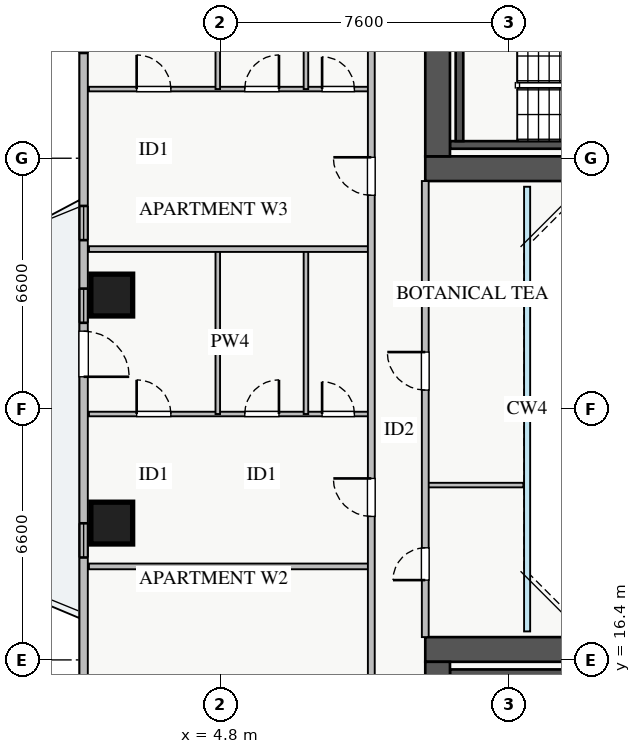
"""IFC4 building model, lengths in metres.
Left out: names, types, materials, properties, quantities, classifications, styles, units other than length and angle.
Written with IfcOpenShell. Run it as: python <this file> out.ifc"""

import sys

from ifc_helpers import new_model, si_unit, direction, frame, frame_2d, origin, origin_2d, place, context, subcontext, project, spatial, rectangle, extrude, source, transform, mapped, element, fill, save


model = new_model("IFC4")
c1 = context("Model", 3, precision=1e-05, world=origin(), true_north=direction((0.0, 1.0)))
c2 = subcontext(c1, "Body", "Model", "MODEL_VIEW")
j1 = project(units=[si_unit("LENGTHUNIT", "METRE"), si_unit("PLANEANGLEUNIT", "RADIAN")], contexts=[c1])
p1 = place(None, origin())
s1 = spatial("IfcSite", under=j1, at=p1, CompositionType="ELEMENT")
p2 = place(p1, origin())
s2 = spatial("IfcBuilding", under=s1, at=p2, CompositionType="ELEMENT")
p3 = place(p2, frame((0.0, 0.0, 110.0)))
s3 = spatial("IfcBuildingStorey", under=s2, at=p3, CompositionType="ELEMENT", Elevation=110.0)
p4 = place(p3, frame((10.85, 29.95, 0.0), z_axis=(0.0, 0.0, 1.0), x_axis=(1.0, 0.0, 0.0)))
e1 = element("IfcWall", 1, at=p4, inside=s3, PredefinedType="SHEAR", context=c2, shape_type="SweptSolid", body=[
    extrude(rectangle(XDim=7.3, YDim=0.2, at=frame_2d((3.65, 0.0))), origin(), (0.0, 0.0, 1.0), 3.25),
])
p5 = place(p3, frame((11.1, 30.05, 0.0), z_axis=(0.0, 0.0, 1.0), x_axis=(0.0, 1.0, 0.0)))
e2 = element("IfcWall", 2, at=p5, inside=s3, PredefinedType="SHEAR", context=c2, shape_type="SweptSolid", body=[
    extrude(rectangle(XDim=2.94, YDim=0.2, at=frame_2d((1.47, 0.0))), origin(), (0.0, 0.0, 1.0), 3.25),
])
p6 = place(p3, frame((10.85, 16.05, 0.0), z_axis=(0.0, 0.0, 1.0), x_axis=(1.0, 0.0, 0.0)))
e3 = element("IfcWall", 3, at=p6, inside=s3, PredefinedType="SHEAR", context=c2, shape_type="SweptSolid", body=[
    extrude(rectangle(XDim=7.3, YDim=0.2, at=frame_2d((3.65, 0.0))), origin(), (0.0, 0.0, 1.0), 3.25),
])
p7 = place(p3, frame((10.2, 29.325, 0.0), z_axis=(0.0, 0.0, 1.0), x_axis=(1.0, 0.0, 0.0)))
e4 = element("IfcWall", 4, at=p7, inside=s3, PredefinedType="SHEAR", context=c2, shape_type="SweptSolid", body=[
    extrude(rectangle(XDim=17.6, YDim=0.65, at=frame_2d((8.8, 0.0))), origin(), (0.0, 0.0, 1.0), 3.25),
])
p8 = place(p3, frame((10.525, 29.65, 0.0), z_axis=(0.0, 0.0, 1.0), x_axis=(0.0, 1.0, 0.0)))
e5 = element("IfcWall", 5, at=p8, inside=s3, PredefinedType="SHEAR", context=c2, shape_type="SweptSolid", body=[
    extrude(rectangle(XDim=5.9, YDim=0.65, at=frame_2d((2.95, 0.0))), origin(), (0.0, 0.0, 1.0), 3.25),
])
p9 = place(p3, frame((10.2, 16.675, 0.0), z_axis=(0.0, 0.0, 1.0), x_axis=(1.0, 0.0, 0.0)))
e6 = element("IfcWall", 6, at=p9, inside=s3, PredefinedType="SHEAR", context=c2, shape_type="SweptSolid", body=[
    extrude(rectangle(XDim=17.6, YDim=0.65, at=frame_2d((8.8, 0.0))), origin(), (0.0, 0.0, 1.0), 3.25),
])
p10 = place(p3, frame((10.525, 10.45, 0.0), z_axis=(0.0, 0.0, 1.0), x_axis=(0.0, 1.0, 0.0)))
e7 = element("IfcWall", 7, at=p10, inside=s3, PredefinedType="SHEAR", context=c2, shape_type="SweptSolid", body=[
    extrude(rectangle(XDim=5.9, YDim=0.65, at=frame_2d((2.95, 0.0))), origin(), (0.0, 0.0, 1.0), 3.25),
])
m1 = source(origin(), c2, "Body", "SweptSolid", [
    extrude(rectangle(XDim=1.1, YDim=1.1, at=origin_2d()), origin(), (0.0, 0.0, 1.0), 3.25),
])
for number, where, z_axis, x_axis in (
    (8, (1.95, 26.0, 0.0), (0.0, 0.0, 1.0), (1.0, 0.0, 0.0)),
    (9, (1.95, 20.0, 0.0), (0.0, 0.0, 1.0), (1.0, 0.0, 0.0)),
):
    element("IfcColumn", number, at=place(p3, frame(where, z_axis=z_axis, x_axis=x_axis)), inside=s3, PredefinedType="COLUMN", context=c2, shape_type="MappedRepresentation", body=[
        mapped(m1, transform((0.0, 0.0, 0.0), x_axis=(1.0, 0.0, 0.0), y_axis=(0.0, 1.0, 0.0), z_axis=(0.0, 0.0, 1.0), scale=1.0)),
    ])
p11 = place(p3, frame((1.21, 10.55, 0.0), z_axis=(0.0, 0.0, 1.0), x_axis=(0.0, 1.0, 0.0)))
e10 = element("IfcWall", 10, at=p11, inside=s3, PredefinedType="STANDARD", context=c2, shape_type="SweptSolid", body=[
    extrude(rectangle(XDim=24.9, YDim=0.22, at=frame_2d((12.45, 0.0))), origin(), (0.0, 0.0, 1.0), 2.61),
])
p12 = place(p11, frame((13.3, 0.0, 0.0)))
e11 = element("IfcOpeningElement", 11, at=p12, cuts=e10, PredefinedType="OPENING", context=c2, shape_type="SweptSolid", body=[
    extrude(rectangle(XDim=1.2, YDim=2.1, at=frame_2d((0.6, 1.05))), frame((0.0, 0.12, 0.0), z_axis=(0.0, -1.0, 0.0), x_axis=(1.0, 0.0, 0.0)), (0.0, 0.0, 1.0), 0.24),
])
p13 = place(p11, frame((1.912, 0.0, 0.9)))
e12 = element("IfcOpeningElement", 12, at=p13, cuts=e10, PredefinedType="OPENING", context=c2, shape_type="SweptSolid", body=[
    extrude(rectangle(XDim=2.4, YDim=1.48, at=frame_2d((1.2, 0.74))), frame((0.0, 0.12, 0.0), z_axis=(0.0, -1.0, 0.0), x_axis=(1.0, 0.0, 0.0)), (0.0, 0.0, 1.0), 0.24),
])
p14 = place(p11, frame((21.82, 0.0, 0.9)))
e13 = element("IfcOpeningElement", 13, at=p14, cuts=e10, PredefinedType="OPENING", context=c2, shape_type="SweptSolid", body=[
    extrude(rectangle(XDim=2.1, YDim=1.5, at=frame_2d((1.05, 0.75))), frame((0.0, 0.12, 0.0), z_axis=(0.0, -1.0, 0.0), x_axis=(1.0, 0.0, 0.0)), (0.0, 0.0, 1.0), 0.24),
])
p15 = place(p11, frame((14.72, 0.0, 0.9)))
e14 = element("IfcOpeningElement", 14, at=p15, cuts=e10, PredefinedType="OPENING", context=c2, shape_type="SweptSolid", body=[
    extrude(rectangle(XDim=0.9, YDim=1.2, at=frame_2d((0.45, 0.6))), frame((0.0, 0.12, 0.0), z_axis=(0.0, -1.0, 0.0), x_axis=(1.0, 0.0, 0.0)), (0.0, 0.0, 1.0), 0.24),
])
p16 = place(p11, frame((8.545, 0.0, 0.9)))
e15 = element("IfcOpeningElement", 15, at=p16, cuts=e10, PredefinedType="OPENING", context=c2, shape_type="SweptSolid", body=[
    extrude(rectangle(XDim=0.9, YDim=1.2, at=frame_2d((0.45, 0.6))), frame((0.0, 0.12, 0.0), z_axis=(0.0, -1.0, 0.0), x_axis=(1.0, 0.0, 0.0)), (0.0, 0.0, 1.0), 0.24),
])
p17 = place(p11, frame((16.895, 0.0, 0.9)))
e16 = element("IfcOpeningElement", 16, at=p17, cuts=e10, PredefinedType="OPENING", context=c2, shape_type="SweptSolid", body=[
    extrude(rectangle(XDim=0.9, YDim=1.2, at=frame_2d((0.45, 0.6))), frame((0.0, 0.12, 0.0), z_axis=(0.0, -1.0, 0.0), x_axis=(1.0, 0.0, 0.0)), (0.0, 0.0, 1.0), 0.24),
])
p18 = place(p3, frame((1.35, 22.87, 0.0), z_axis=(0.0, 0.0, 1.0), x_axis=(1.0, 0.0, 0.0)))
e17 = element("IfcWall", 17, at=p18, inside=s3, PredefinedType="PLUMBINGWALL", context=c2, shape_type="SweptSolid", body=[
    extrude(rectangle(XDim=7.43, YDim=0.12, at=frame_2d((3.715, 0.0))), origin(), (0.0, 0.0, 1.0), 3.07),
])
p19 = place(p18, frame((1.255, 0.0, 0.0)))
e18 = element("IfcOpeningElement", 18, at=p19, cuts=e17, PredefinedType="OPENING", context=c2, shape_type="SweptSolid", body=[
    extrude(rectangle(XDim=0.9, YDim=2.05, at=frame_2d((0.45, 1.025))), frame((0.0, 0.07, 0.0), z_axis=(0.0, -1.0, 0.0), x_axis=(1.0, 0.0, 0.0)), (0.0, 0.0, 1.0), 0.14),
])
p20 = place(p18, frame((4.1, 0.0, 0.0)))
e19 = element("IfcOpeningElement", 19, at=p20, cuts=e17, PredefinedType="OPENING", context=c2, shape_type="SweptSolid", body=[
    extrude(rectangle(XDim=0.9, YDim=2.05, at=frame_2d((0.45, 1.025))), frame((0.0, 0.07, 0.0), z_axis=(0.0, -1.0, 0.0), x_axis=(1.0, 0.0, 0.0)), (0.0, 0.0, 1.0), 0.14),
])
p21 = place(p18, frame((6.135, 0.0, 0.0)))
e20 = element("IfcOpeningElement", 20, at=p21, cuts=e17, PredefinedType="OPENING", context=c2, shape_type="SweptSolid", body=[
    extrude(rectangle(XDim=0.85, YDim=2.05, at=frame_2d((0.425, 1.025))), frame((0.0, 0.07, 0.0), z_axis=(0.0, -1.0, 0.0), x_axis=(1.0, 0.0, 0.0)), (0.0, 0.0, 1.0), 0.14),
])
for number, where, z_axis, x_axis in (
    (21, (4.74, 22.87, 0.0), (0.0, 0.0, 1.0), (0.0, 1.0, 0.0)),
    (22, (7.06, 22.87, 0.0), (0.0, 0.0, 1.0), (0.0, 1.0, 0.0)),
):
    element("IfcWall", number, at=place(p3, frame(where, z_axis=z_axis, x_axis=x_axis)), inside=s3, PredefinedType="PLUMBINGWALL", context=c2, shape_type="SweptSolid", body=[
        extrude(rectangle(XDim=4.34, YDim=0.12, at=frame_2d((2.17, 0.0))), origin(), (0.0, 0.0, 1.0), 3.07),
    ])
p22 = place(p3, frame((1.35, 18.86, 0.0), z_axis=(0.0, 0.0, 1.0), x_axis=(1.0, 0.0, 0.0)))
e23 = element("IfcWall", 23, at=p22, inside=s3, PredefinedType="PARTITIONING", context=c2, shape_type="SweptSolid", body=[
    extrude(rectangle(XDim=7.43, YDim=0.15, at=frame_2d((3.715, 0.0))), origin(), (0.0, 0.0, 1.0), 3.07),
])
p23 = place(p3, frame((1.35, 31.42, 0.0), z_axis=(0.0, 0.0, 1.0), x_axis=(1.0, 0.0, 0.0)))
e24 = element("IfcWall", 24, at=p23, inside=s3, PredefinedType="PLUMBINGWALL", context=c2, shape_type="SweptSolid", body=[
    extrude(rectangle(XDim=7.43, YDim=0.12, at=frame_2d((3.715, 0.0))), origin(), (0.0, 0.0, 1.0), 3.07),
])
p24 = place(p23, frame((1.255, 0.0, 0.0)))
e25 = element("IfcOpeningElement", 25, at=p24, cuts=e24, PredefinedType="OPENING", context=c2, shape_type="SweptSolid", body=[
    extrude(rectangle(XDim=0.9, YDim=2.05, at=frame_2d((0.45, 1.025))), frame((0.0, 0.07, 0.0), z_axis=(0.0, -1.0, 0.0), x_axis=(1.0, 0.0, 0.0)), (0.0, 0.0, 1.0), 0.14),
])
p25 = place(p23, frame((4.1, 0.0, 0.0)))
e26 = element("IfcOpeningElement", 26, at=p25, cuts=e24, PredefinedType="OPENING", context=c2, shape_type="SweptSolid", body=[
    extrude(rectangle(XDim=0.9, YDim=2.05, at=frame_2d((0.45, 1.025))), frame((0.0, 0.07, 0.0), z_axis=(0.0, -1.0, 0.0), x_axis=(1.0, 0.0, 0.0)), (0.0, 0.0, 1.0), 0.14),
])
p26 = place(p23, frame((6.135, 0.0, 0.0)))
e27 = element("IfcOpeningElement", 27, at=p26, cuts=e24, PredefinedType="OPENING", context=c2, shape_type="SweptSolid", body=[
    extrude(rectangle(XDim=0.85, YDim=2.05, at=frame_2d((0.425, 1.025))), frame((0.0, 0.07, 0.0), z_axis=(0.0, -1.0, 0.0), x_axis=(1.0, 0.0, 0.0)), (0.0, 0.0, 1.0), 0.14),
])
p27 = place(p3, frame((4.74, 31.42, 0.0), z_axis=(0.0, 0.0, 1.0), x_axis=(0.0, 1.0, 0.0)))
e28 = element("IfcWall", 28, at=p27, inside=s3, PredefinedType="PLUMBINGWALL", context=c2, shape_type="SweptSolid", body=[
    extrude(rectangle(XDim=4.56, YDim=0.12, at=frame_2d((2.28, 0.0))), origin(), (0.0, 0.0, 1.0), 3.07),
])
p28 = place(p3, frame((7.06, 31.42, 0.0), z_axis=(0.0, 0.0, 1.0), x_axis=(0.0, 1.0, 0.0)))
e29 = element("IfcWall", 29, at=p28, inside=s3, PredefinedType="PLUMBINGWALL", context=c2, shape_type="SweptSolid", body=[
    extrude(rectangle(XDim=4.56, YDim=0.12, at=frame_2d((2.28, 0.0))), origin(), (0.0, 0.0, 1.0), 2.577),
])
p29 = place(p3, frame((1.35, 27.21, 0.0), z_axis=(0.0, 0.0, 1.0), x_axis=(1.0, 0.0, 0.0)))
e30 = element("IfcWall", 30, at=p29, inside=s3, PredefinedType="PARTITIONING", context=c2, shape_type="SweptSolid", body=[
    extrude(rectangle(XDim=7.43, YDim=0.15, at=frame_2d((3.715, 0.0))), origin(), (0.0, 0.0, 1.0), 3.07),
])
p30 = place(p3, frame((8.78, 8.31, 0.0), z_axis=(0.0, 0.0, 1.0), x_axis=(0.0, 1.0, 0.0)))
e31 = element("IfcWall", 31, at=p30, inside=s3, PredefinedType="PARTITIONING", context=c2, shape_type="SweptSolid", body=[
    extrude(rectangle(XDim=29.34, YDim=0.18, at=frame_2d((14.67, 0.0))), origin(), (0.0, 0.0, 1.0), 3.07),
])
p31 = place(p30, frame((28.045, 0.0, 0.0)))
e32 = element("IfcOpeningElement", 32, at=p31, cuts=e31, PredefinedType="OPENING", context=c2, shape_type="SweptSolid", body=[
    extrude(rectangle(XDim=0.9, YDim=2.05, at=frame_2d((0.45, 1.025))), frame((0.0, 0.1, 0.0), z_axis=(0.0, -1.0, 0.0), x_axis=(1.0, 0.0, 0.0)), (0.0, 0.0, 1.0), 0.2),
])
p32 = place(p30, frame((0.24, 0.0, 0.0)))
e33 = element("IfcOpeningElement", 33, at=p32, cuts=e31, PredefinedType="OPENING", context=c2, shape_type="SweptSolid", body=[
    extrude(rectangle(XDim=0.9, YDim=2.05, at=frame_2d((0.45, 1.025))), frame((0.0, 0.1, 0.0), z_axis=(0.0, -1.0, 0.0), x_axis=(1.0, 0.0, 0.0)), (0.0, 0.0, 1.0), 0.2),
])
p33 = place(p30, frame((5.455, 0.0, 0.0)))
e34 = element("IfcOpeningElement", 34, at=p33, cuts=e31, PredefinedType="OPENING", context=c2, shape_type="SweptSolid", body=[
    extrude(rectangle(XDim=1.0, YDim=2.05, at=frame_2d((0.5, 1.025))), frame((0.0, 0.1, 0.0), z_axis=(0.0, -1.0, 0.0), x_axis=(1.0, 0.0, 0.0)), (0.0, 0.0, 1.0), 0.2),
])
p34 = place(p30, frame((11.865, 0.0, 0.0)))
e35 = element("IfcOpeningElement", 35, at=p34, cuts=e31, PredefinedType="OPENING", context=c2, shape_type="SweptSolid", body=[
    extrude(rectangle(XDim=1.0, YDim=2.05, at=frame_2d((0.5, 1.025))), frame((0.0, 0.1, 0.0), z_axis=(0.0, -1.0, 0.0), x_axis=(1.0, 0.0, 0.0)), (0.0, 0.0, 1.0), 0.2),
])
p35 = place(p30, frame((20.315, 0.0, 0.0)))
e36 = element("IfcOpeningElement", 36, at=p35, cuts=e31, PredefinedType="OPENING", context=c2, shape_type="SweptSolid", body=[
    extrude(rectangle(XDim=1.0, YDim=2.05, at=frame_2d((0.5, 1.025))), frame((0.0, 0.1, 0.0), z_axis=(0.0, -1.0, 0.0), x_axis=(1.0, 0.0, 0.0)), (0.0, 0.0, 1.0), 0.2),
])
p36 = place(p3, frame((10.2, 21.0, 0.0), z_axis=(0.0, 0.0, 1.0), x_axis=(1.0, 0.0, 0.0)))
e37 = element("IfcWall", 37, at=p36, inside=s3, PredefinedType="PLUMBINGWALL", context=c2, shape_type="SweptSolid", body=[
    extrude(rectangle(XDim=2.58, YDim=0.12, at=frame_2d((1.29, 0.0))), origin(), (0.0, 0.0, 1.0), 3.07),
])
p37 = place(p3, frame((10.2, 17.0, 0.0), z_axis=(0.0, 0.0, 1.0), x_axis=(0.0, 1.0, 0.0)))
e38 = element("IfcWall", 38, at=p37, inside=s3, PredefinedType="PARTITIONING", context=c2, shape_type="SweptSolid", body=[
    extrude(rectangle(XDim=12.0, YDim=0.18, at=frame_2d((6.0, 0.0))), origin(), (0.0, 0.0, 1.0), 3.07),
])
p38 = place(p37, frame((1.5, 0.0, 0.0)))
e39 = element("IfcOpeningElement", 39, at=p38, cuts=e38, PredefinedType="OPENING", context=c2, shape_type="SweptSolid", body=[
    extrude(rectangle(XDim=0.85, YDim=2.05, at=frame_2d((0.425, 1.025))), frame((0.0, 0.1, 0.0), z_axis=(0.0, -1.0, 0.0), x_axis=(1.0, 0.0, 0.0)), (0.0, 0.0, 1.0), 0.2),
])
p39 = place(p37, frame((6.5, 0.0, 0.0)))
e40 = element("IfcOpeningElement", 40, at=p39, cuts=e38, PredefinedType="OPENING", context=c2, shape_type="SweptSolid", body=[
    extrude(rectangle(XDim=1.0, YDim=2.05, at=frame_2d((0.5, 1.025))), frame((0.0, 0.1, 0.0), z_axis=(0.0, -1.0, 0.0), x_axis=(1.0, 0.0, 0.0)), (0.0, 0.0, 1.0), 0.2),
])
m2 = source(origin(), c2, "Body", "SweptSolid", [
    extrude(rectangle(XDim=1.2, YDim=2.1, at=frame_2d((0.6, 1.05))), frame((0.0, 0.025, 0.0), z_axis=(0.0, -1.0, 0.0), x_axis=(1.0, 0.0, 0.0)), (0.0, 0.0, 1.0), 0.05),
])
p40 = place(p12, frame((1.2, 0.0, 0.0), z_axis=(0.0, 0.0, 1.0), x_axis=(-1.0, 0.0, 0.0)))
e41 = element("IfcDoor", 41, at=p40, inside=s3, OperationType="SINGLE_SWING_LEFT", PredefinedType="DOOR", context=c2, shape_type="MappedRepresentation", body=[
    mapped(m2, transform((0.0, 0.0, 0.0), x_axis=(1.0, 0.0, 0.0), y_axis=(0.0, 1.0, 0.0), z_axis=(0.0, 0.0, 1.0), scale=1.0)),
])
fill(e11, e41)
m3 = source(origin(), c2, "Body", "SweptSolid", [
    extrude(rectangle(XDim=2.1, YDim=1.5, at=frame_2d((1.05, 0.75))), frame((0.0, 0.03, 0.0), z_axis=(0.0, -1.0, 0.0), x_axis=(1.0, 0.0, 0.0)), (0.0, 0.0, 1.0), 0.06),
])
p41 = place(p14, origin())
e42 = element("IfcWindow", 42, at=p41, inside=s3, PartitioningType="TRIPLE_PANEL_VERTICAL", PredefinedType="WINDOW", context=c2, shape_type="MappedRepresentation", body=[
    mapped(m3, transform((0.0, 0.0, 0.0), x_axis=(1.0, 0.0, 0.0), y_axis=(0.0, 1.0, 0.0), z_axis=(0.0, 0.0, 1.0), scale=1.0)),
])
fill(e13, e42)
m4 = source(origin(), c2, "Body", "SweptSolid", [
    extrude(rectangle(XDim=0.9, YDim=2.05, at=frame_2d((0.45, 1.025))), frame((0.0, 0.025, 0.0), z_axis=(0.0, -1.0, 0.0), x_axis=(1.0, 0.0, 0.0)), (0.0, 0.0, 1.0), 0.05),
])
p42 = place(p19, origin())
e43 = element("IfcDoor", 43, at=p42, inside=s3, OperationType="SINGLE_SWING_LEFT", PredefinedType="DOOR", context=c2, shape_type="MappedRepresentation", body=[
    mapped(m4, transform((0.0, 0.0, 0.0), x_axis=(1.0, 0.0, 0.0), y_axis=(0.0, 1.0, 0.0), z_axis=(0.0, 0.0, 1.0), scale=1.0)),
])
fill(e18, e43)
p43 = place(p20, origin())
e44 = element("IfcDoor", 44, at=p43, inside=s3, OperationType="SINGLE_SWING_RIGHT", PredefinedType="DOOR", context=c2, shape_type="MappedRepresentation", body=[
    mapped(m4, transform((0.0, 0.0, 0.0), x_axis=(1.0, 0.0, 0.0), y_axis=(0.0, 1.0, 0.0), z_axis=(0.0, 0.0, 1.0), scale=1.0)),
])
fill(e19, e44)
m5 = source(origin(), c2, "Body", "SweptSolid", [
    extrude(rectangle(XDim=0.85, YDim=2.05, at=frame_2d((0.425, 1.025))), frame((0.0, 0.025, 0.0), z_axis=(0.0, -1.0, 0.0), x_axis=(1.0, 0.0, 0.0)), (0.0, 0.0, 1.0), 0.05),
])
p44 = place(p21, origin())
e45 = element("IfcDoor", 45, at=p44, inside=s3, OperationType="SINGLE_SWING_LEFT", PredefinedType="DOOR", context=c2, shape_type="MappedRepresentation", body=[
    mapped(m5, transform((0.0, 0.0, 0.0), x_axis=(1.0, 0.0, 0.0), y_axis=(0.0, 1.0, 0.0), z_axis=(0.0, 0.0, 1.0), scale=1.0)),
])
fill(e20, e45)
p45 = place(p24, origin())
e46 = element("IfcDoor", 46, at=p45, inside=s3, OperationType="SINGLE_SWING_LEFT", PredefinedType="DOOR", context=c2, shape_type="MappedRepresentation", body=[
    mapped(m4, transform((0.0, 0.0, 0.0), x_axis=(1.0, 0.0, 0.0), y_axis=(0.0, 1.0, 0.0), z_axis=(0.0, 0.0, 1.0), scale=1.0)),
])
fill(e25, e46)
p46 = place(p25, origin())
e47 = element("IfcDoor", 47, at=p46, inside=s3, OperationType="SINGLE_SWING_RIGHT", PredefinedType="DOOR", context=c2, shape_type="MappedRepresentation", body=[
    mapped(m4, transform((0.0, 0.0, 0.0), x_axis=(1.0, 0.0, 0.0), y_axis=(0.0, 1.0, 0.0), z_axis=(0.0, 0.0, 1.0), scale=1.0)),
])
fill(e26, e47)
p47 = place(p26, origin())
e48 = element("IfcDoor", 48, at=p47, inside=s3, OperationType="SINGLE_SWING_LEFT", PredefinedType="DOOR", context=c2, shape_type="MappedRepresentation", body=[
    mapped(m5, transform((0.0, 0.0, 0.0), x_axis=(1.0, 0.0, 0.0), y_axis=(0.0, 1.0, 0.0), z_axis=(0.0, 0.0, 1.0), scale=1.0)),
])
fill(e27, e48)
m6 = source(origin(), c2, "Body", "SweptSolid", [
    extrude(rectangle(XDim=1.0, YDim=2.05, at=frame_2d((0.5, 1.025))), frame((0.0, 0.025, 0.0), z_axis=(0.0, -1.0, 0.0), x_axis=(1.0, 0.0, 0.0)), (0.0, 0.0, 1.0), 0.05),
])
p48 = place(p34, origin())
e49 = element("IfcDoor", 49, at=p48, inside=s3, OperationType="SINGLE_SWING_RIGHT", PredefinedType="DOOR", context=c2, shape_type="MappedRepresentation", body=[
    mapped(m6, transform((0.0, 0.0, 0.0), x_axis=(1.0, 0.0, 0.0), y_axis=(0.0, 1.0, 0.0), z_axis=(0.0, 0.0, 1.0), scale=1.0)),
])
fill(e35, e49)
p49 = place(p35, origin())
e50 = element("IfcDoor", 50, at=p49, inside=s3, OperationType="SINGLE_SWING_RIGHT", PredefinedType="DOOR", context=c2, shape_type="MappedRepresentation", body=[
    mapped(m6, transform((0.0, 0.0, 0.0), x_axis=(1.0, 0.0, 0.0), y_axis=(0.0, 1.0, 0.0), z_axis=(0.0, 0.0, 1.0), scale=1.0)),
])
fill(e36, e50)
p50 = place(p38, origin())
e51 = element("IfcDoor", 51, at=p50, inside=s3, OperationType="SINGLE_SWING_LEFT", PredefinedType="DOOR", context=c2, shape_type="MappedRepresentation", body=[
    mapped(m5, transform((0.0, 0.0, 0.0), x_axis=(1.0, 0.0, 0.0), y_axis=(0.0, 1.0, 0.0), z_axis=(0.0, 0.0, 1.0), scale=1.0)),
])
fill(e39, e51)
p51 = place(p39, origin())
e52 = element("IfcDoor", 52, at=p51, inside=s3, OperationType="SINGLE_SWING_RIGHT", PredefinedType="DOOR", context=c2, shape_type="MappedRepresentation", body=[
    mapped(m6, transform((0.0, 0.0, 0.0), x_axis=(1.0, 0.0, 0.0), y_axis=(0.0, 1.0, 0.0), z_axis=(0.0, 0.0, 1.0), scale=1.0)),
])
fill(e40, e52)
m7 = source(origin(), c2, "Body", "SweptSolid", [
    extrude(rectangle(XDim=0.9, YDim=1.2, at=frame_2d((0.45, 0.6))), frame((0.0, 0.03, 0.0), z_axis=(0.0, -1.0, 0.0), x_axis=(1.0, 0.0, 0.0)), (0.0, 0.0, 1.0), 0.06),
])
p52 = place(p15, origin())
e53 = element("IfcWindow", 53, at=p52, inside=s3, PartitioningType="SINGLE_PANEL", PredefinedType="WINDOW", context=c2, shape_type="MappedRepresentation", body=[
    mapped(m7, transform((0.0, 0.0, 0.0), x_axis=(1.0, 0.0, 0.0), y_axis=(0.0, 1.0, 0.0), z_axis=(0.0, 0.0, 1.0), scale=1.0)),
])
fill(e14, e53)
p53 = place(p16, origin())
e54 = element("IfcWindow", 54, at=p53, inside=s3, PartitioningType="SINGLE_PANEL", PredefinedType="WINDOW", context=c2, shape_type="MappedRepresentation", body=[
    mapped(m7, transform((0.0, 0.0, 0.0), x_axis=(1.0, 0.0, 0.0), y_axis=(0.0, 1.0, 0.0), z_axis=(0.0, 0.0, 1.0), scale=1.0)),
])
fill(e15, e54)
p54 = place(p17, origin())
e55 = element("IfcWindow", 55, at=p54, inside=s3, PartitioningType="SINGLE_PANEL", PredefinedType="WINDOW", context=c2, shape_type="MappedRepresentation", body=[
    mapped(m7, transform((0.0, 0.0, 0.0), x_axis=(1.0, 0.0, 0.0), y_axis=(0.0, 1.0, 0.0), z_axis=(0.0, 0.0, 1.0), scale=1.0)),
])
fill(e16, e55)
save(model, sys.argv[1])
